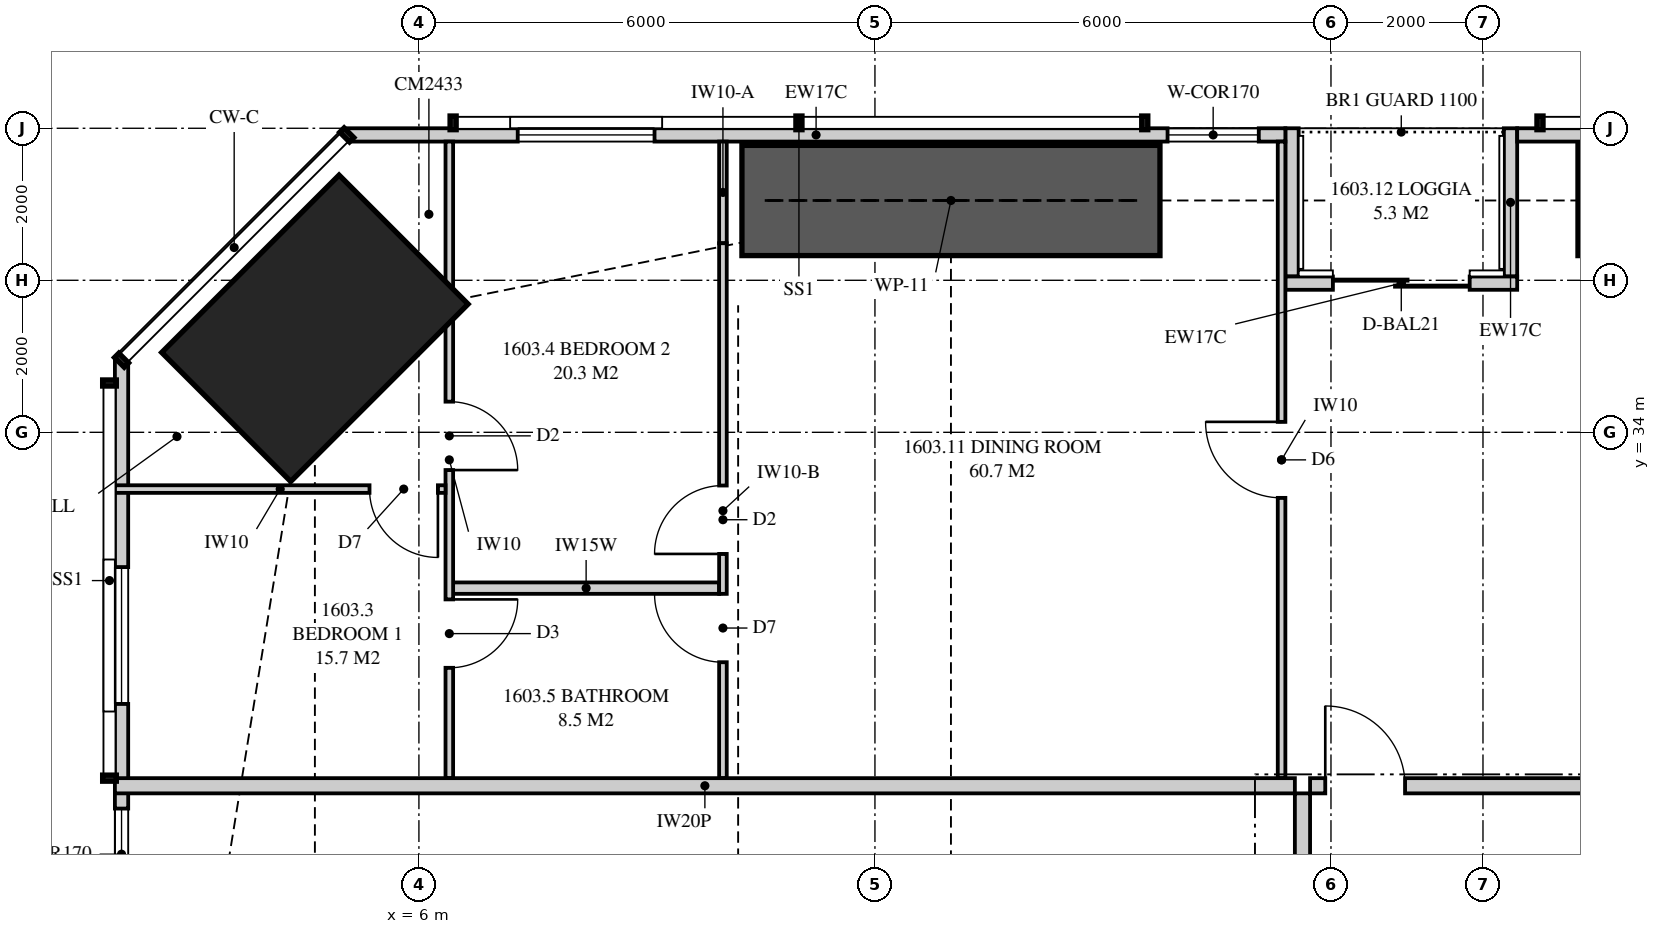
"""IFC4 building model, lengths in metres.
Left out: names, types, materials, properties, quantities, classifications, styles, units other than length and angle.
Written with IfcOpenShell. Run it as: python <this file> out.ifc"""

import sys

from ifc_helpers import new_model, si_unit, direction, frame, frame_2d, origin, origin_2d, place, context, subcontext, project, spatial, polyline, rectangle, outline, extrude, element, fill, save


model = new_model("IFC4")
c1 = context("Model", 3, precision=1e-05, world=origin(), true_north=direction((0.0, 1.0)))
c2 = subcontext(c1, "Body", "Model", "MODEL_VIEW")
j1 = project(units=[si_unit("LENGTHUNIT", "METRE"), si_unit("PLANEANGLEUNIT", "RADIAN")], contexts=[c1])
p1 = place(None, origin())
s1 = spatial("IfcSite", under=j1, at=p1, CompositionType="ELEMENT")
p2 = place(p1, origin())
s2 = spatial("IfcBuilding", under=s1, at=p2, CompositionType="ELEMENT")
p3 = place(p2, frame((0.0, 0.0, 61.2)))
s3 = spatial("IfcBuildingStorey", under=s2, at=p3, CompositionType="ELEMENT", Elevation=61.2)
p4 = place(p3, frame((4.631, 35.369, 0.0), z_axis=(0.0, 0.0, 1.0), x_axis=(0.707106781187, -0.707106781187, 0.0)))
e1 = element("IfcColumn", 1, at=p4, inside=s3, PredefinedType="COLUMN", context=c2, shape_type="SweptSolid", body=[
    extrude(rectangle(XDim=2.4, YDim=3.3, at=origin_2d()), origin(), (0.0, 0.0, 1.0), 3.35),
])
p5 = place(p3, frame((37.824, 37.913, 0.0), z_axis=(0.0, 0.0, 1.0), x_axis=(-1.0, 0.0, 0.0)))
e2 = element("IfcWall", 2, at=p5, inside=s3, PredefinedType="SOLIDWALL", context=c2, shape_type="SweptSolid", body=[
    extrude(outline(polyline([(0.0, 0.0), (17.374, 0.0), (17.374, 2.15), (2.824, 2.15), (2.824, 3.11), (2.668, 3.11), (2.668, 2.15), (2.62, 2.15), (2.62, 3.11), (0.0, 3.11), (0.0, 0.0)])), frame((0.0, 0.087, 0.0), z_axis=(0.0, -1.0, 0.0), x_axis=(1.0, 0.0, 0.0)), (0.0, 0.0, 1.0), 0.175),
])
p6 = place(p5, frame((5.699, 0.0, 0.4)))
e3 = element("IfcOpeningElement", 3, at=p6, cuts=e2, PredefinedType="OPENING", context=c2, shape_type="SweptSolid", body=[
    extrude(rectangle(XDim=1.8, YDim=1.7, at=frame_2d((0.9, 0.85))), frame((0.0, 0.097, 0.0), z_axis=(0.0, -1.0, 0.0), x_axis=(1.0, 0.0, 0.0)), (0.0, 0.0, 1.0), 0.195),
])
p7 = place(p5, frame((9.124, 0.0, 0.4)))
e4 = element("IfcOpeningElement", 4, at=p7, cuts=e2, PredefinedType="OPENING", context=c2, shape_type="SweptSolid", body=[
    extrude(rectangle(XDim=1.8, YDim=1.7, at=frame_2d((0.9, 0.85))), frame((0.0, 0.097, 0.0), z_axis=(0.0, -1.0, 0.0), x_axis=(1.0, 0.0, 0.0)), (0.0, 0.0, 1.0), 0.195),
])
p8 = place(p3, frame((17.4, 37.913, 0.0), z_axis=(0.0, 0.0, 1.0), x_axis=(-1.0, 0.0, 0.0)))
e5 = element("IfcWall", 5, at=p8, inside=s3, PredefinedType="SOLIDWALL", context=c2, shape_type="SweptSolid", body=[
    extrude(outline(polyline([(0.0, 0.0), (12.349, 0.0), (12.349, 3.11), (4.604, 3.11), (4.604, 2.15), (4.556, 2.15), (4.556, 3.11), (4.4, 3.11), (4.4, 2.15), (0.0, 2.15), (0.0, 0.0)])), frame((0.0, 0.087, 0.0), z_axis=(0.0, -1.0, 0.0), x_axis=(1.0, 0.0, 0.0)), (0.0, 0.0, 1.0), 0.175),
])
p9 = place(p8, frame((0.35, 0.0, 0.4)))
e6 = element("IfcOpeningElement", 6, at=p9, cuts=e5, PredefinedType="OPENING", context=c2, shape_type="SweptSolid", body=[
    extrude(rectangle(XDim=1.2, YDim=1.7, at=frame_2d((0.6, 0.85))), frame((0.0, 0.097, 0.0), z_axis=(0.0, -1.0, 0.0), x_axis=(1.0, 0.0, 0.0)), (0.0, 0.0, 1.0), 0.195),
])
p10 = place(p8, frame((8.3, 0.0, 0.4)))
e7 = element("IfcOpeningElement", 7, at=p10, cuts=e5, PredefinedType="OPENING", context=c2, shape_type="SweptSolid", body=[
    extrude(rectangle(XDim=1.8, YDim=1.7, at=frame_2d((0.9, 0.85))), frame((0.0, 0.097, 0.0), z_axis=(0.0, -1.0, 0.0), x_axis=(1.0, 0.0, 0.0)), (0.0, 0.0, 1.0), 0.195),
])
p11 = place(p3, frame((20.45, 35.962, 0.0), z_axis=(0.0, 0.0, 1.0), x_axis=(-1.0, 0.0, 0.0)))
e8 = element("IfcWall", 8, at=p11, inside=s3, PredefinedType="SOLIDWALL", context=c2, shape_type="SweptSolid", body=[
    extrude(rectangle(XDim=3.05, YDim=0.175, at=frame_2d((1.525, 0.0))), origin(), (0.0, 0.0, 1.0), 3.11),
])
p12 = place(p11, frame((0.625, 0.0, 0.0)))
e9 = element("IfcOpeningElement", 9, at=p12, cuts=e8, PredefinedType="OPENING", context=c2, shape_type="SweptSolid", body=[
    extrude(rectangle(XDim=1.8, YDim=2.1, at=frame_2d((0.9, 1.05))), frame((0.0, 0.097, 0.0), z_axis=(0.0, -1.0, 0.0), x_axis=(1.0, 0.0, 0.0)), (0.0, 0.0, 1.0), 0.195),
])
for number, where, z_axis, x_axis in (
    (10, (20.363, 38.0, 0.0), (0.0, 0.0, 1.0), (0.0, -1.0, 0.0)),
    (11, (17.488, 38.0, 0.0), (0.0, 0.0, 1.0), (0.0, -1.0, 0.0)),
):
    element("IfcWall", number, at=place(p3, frame(where, z_axis=z_axis, x_axis=x_axis)), inside=s3, PredefinedType="SOLIDWALL", context=c2, shape_type="SweptSolid", body=[
        extrude(outline(polyline([(0.0, 0.0), (1.95, 0.0), (1.95, 3.11), (1.75, 3.11), (1.75, 2.15), (0.15, 2.15), (0.15, 3.11), (0.0, 3.11), (0.0, 0.0)])), frame((0.0, 0.087, 0.0), z_axis=(0.0, -1.0, 0.0), x_axis=(1.0, 0.0, 0.0)), (0.0, 0.0, 1.0), 0.175),
    ])
p13 = place(p3, frame((2.087, 34.949, 0.0), z_axis=(0.0, 0.0, 1.0), x_axis=(0.0, -1.0, 0.0)))
e12 = element("IfcWall", 12, at=p13, inside=s3, PredefinedType="SOLIDWALL", context=c2, shape_type="SweptSolid", body=[
    extrude(outline(polyline([(0.0, 0.0), (15.599, 0.0), (15.599, 2.15), (9.949, 2.15), (9.949, 3.11), (9.823, 3.11), (9.823, 2.15), (9.73, 2.15), (9.73, 3.11), (0.0, 3.11), (0.0, 0.0)])), frame((0.0, 0.087, 0.0), z_axis=(0.0, -1.0, 0.0), x_axis=(1.0, 0.0, 0.0)), (0.0, 0.0, 1.0), 0.175),
])
p14 = place(p13, frame((2.722, 0.0, 0.4)))
e13 = element("IfcOpeningElement", 13, at=p14, cuts=e12, PredefinedType="OPENING", context=c2, shape_type="SweptSolid", body=[
    extrude(rectangle(XDim=1.8, YDim=1.7, at=frame_2d((0.9, 0.85))), frame((0.0, 0.097, 0.0), z_axis=(0.0, -1.0, 0.0), x_axis=(1.0, 0.0, 0.0)), (0.0, 0.0, 1.0), 0.195),
])
p15 = place(p13, frame((5.899, 0.0, 0.4)))
e14 = element("IfcOpeningElement", 14, at=p15, cuts=e12, PredefinedType="OPENING", context=c2, shape_type="SweptSolid", body=[
    extrude(rectangle(XDim=1.2, YDim=1.7, at=frame_2d((0.6, 0.85))), frame((0.0, 0.097, 0.0), z_axis=(0.0, -1.0, 0.0), x_axis=(1.0, 0.0, 0.0)), (0.0, 0.0, 1.0), 0.195),
])
p16 = place(p13, frame((12.824, 0.0, 0.4)))
e15 = element("IfcOpeningElement", 15, at=p16, cuts=e12, PredefinedType="OPENING", context=c2, shape_type="SweptSolid", body=[
    extrude(rectangle(XDim=1.8, YDim=1.7, at=frame_2d((0.9, 0.85))), frame((0.0, 0.097, 0.0), z_axis=(0.0, -1.0, 0.0), x_axis=(1.0, 0.0, 0.0)), (0.0, 0.0, 1.0), 0.195),
])
p17 = place(p3, frame((17.725, 29.35, 0.0), z_axis=(0.0, 0.0, 1.0), x_axis=(1.0, 0.0, 0.0)))
e16 = element("IfcWall", 16, at=p17, inside=s3, PredefinedType="PARTITIONING", context=c2, shape_type="SweptSolid", body=[
    extrude(outline(polyline([(0.0, 0.0), (15.275, 0.0), (15.275, 3.11), (6.612, 3.11), (6.612, 2.541), (5.938, 2.541), (5.938, 3.11), (0.0, 3.11), (0.0, 0.0)])), frame((0.0, 0.1, 0.0), z_axis=(0.0, -1.0, 0.0), x_axis=(1.0, 0.0, 0.0)), (0.0, 0.0, 1.0), 0.2),
])
p18 = place(p17, frame((0.2, 0.0, 0.0)))
e17 = element("IfcOpeningElement", 17, at=p18, cuts=e16, PredefinedType="OPENING", context=c2, shape_type="SweptSolid", body=[
    extrude(rectangle(XDim=1.05, YDim=2.2, at=frame_2d((0.525, 1.1))), frame((0.0, 0.11, 0.0), z_axis=(0.0, -1.0, 0.0), x_axis=(1.0, 0.0, 0.0)), (0.0, 0.0, 1.0), 0.22),
])
p19 = place(p3, frame((6.4, 37.825, 0.0), z_axis=(0.0, 0.0, 1.0), x_axis=(0.0, -1.0, 0.0)))
e18 = element("IfcWall", 18, at=p19, inside=s3, PredefinedType="PARTITIONING", context=c2, shape_type="SweptSolid", body=[
    extrude(outline(polyline([(0.0, 0.0), (8.375, 0.0), (8.375, 3.11), (2.978, 3.11), (2.978, 2.15), (1.224, 2.15), (1.224, 3.11), (0.0, 3.11), (0.0, 0.0)])), frame((0.0, 0.05, 0.0), z_axis=(0.0, -1.0, 0.0), x_axis=(1.0, 0.0, 0.0)), (0.0, 0.0, 1.0), 0.1),
])
p20 = place(p19, frame((3.422, 0.0, 0.0)))
e19 = element("IfcOpeningElement", 19, at=p20, cuts=e18, PredefinedType="OPENING", context=c2, shape_type="SweptSolid", body=[
    extrude(rectangle(XDim=0.9, YDim=2.1, at=frame_2d((0.45, 1.05))), frame((0.0, 0.06, 0.0), z_axis=(0.0, -1.0, 0.0), x_axis=(1.0, 0.0, 0.0)), (0.0, 0.0, 1.0), 0.12),
])
p21 = place(p19, frame((6.023, 0.0, 0.0)))
e20 = element("IfcOpeningElement", 20, at=p21, cuts=e18, PredefinedType="OPENING", context=c2, shape_type="SweptSolid", body=[
    extrude(rectangle(XDim=0.9, YDim=2.1, at=frame_2d((0.45, 1.05))), frame((0.0, 0.06, 0.0), z_axis=(0.0, -1.0, 0.0), x_axis=(1.0, 0.0, 0.0)), (0.0, 0.0, 1.0), 0.12),
])
p22 = place(p3, frame((10.0, 37.825, 0.0), z_axis=(0.0, 0.0, 1.0), x_axis=(0.0, -1.0, 0.0)))
e21 = element("IfcWall", 21, at=p22, inside=s3, PredefinedType="PARTITIONING", context=c2, shape_type="SweptSolid", body=[
    extrude(outline(polyline([(0.0, 0.0), (1.338, 0.0), (1.338, 2.15), (0.5, 2.15), (0.5, 3.11), (0.0, 3.11), (0.0, 0.0)])), frame((0.0, 0.05, 0.0), z_axis=(0.0, -1.0, 0.0), x_axis=(1.0, 0.0, 0.0)), (0.0, 0.0, 1.0), 0.1),
])
p23 = place(p3, frame((10.0, 36.487, 0.0), z_axis=(0.0, 0.0, 1.0), x_axis=(0.0, -1.0, 0.0)))
e22 = element("IfcWall", 22, at=p23, inside=s3, PredefinedType="PARTITIONING", context=c2, shape_type="SweptSolid", body=[
    extrude(outline(polyline([(0.0, 0.0), (7.037, 0.0), (7.037, 2.51), (0.917, 2.51), (0.917, 2.15), (0.0, 2.15), (0.0, 0.0)])), frame((0.0, 0.05, 0.0), z_axis=(0.0, -1.0, 0.0), x_axis=(1.0, 0.0, 0.0)), (0.0, 0.0, 1.0), 0.1),
])
p24 = place(p23, frame((3.188, 0.0, 0.0)))
e23 = element("IfcOpeningElement", 23, at=p24, cuts=e22, PredefinedType="OPENING", context=c2, shape_type="SweptSolid", body=[
    extrude(rectangle(XDim=0.9, YDim=2.1, at=frame_2d((0.45, 1.05))), frame((0.0, 0.06, 0.0), z_axis=(0.0, -1.0, 0.0), x_axis=(1.0, 0.0, 0.0)), (0.0, 0.0, 1.0), 0.12),
])
p25 = place(p23, frame((4.612, 0.0, 0.0)))
e24 = element("IfcOpeningElement", 24, at=p25, cuts=e22, PredefinedType="OPENING", context=c2, shape_type="SweptSolid", body=[
    extrude(rectangle(XDim=0.9, YDim=2.1, at=frame_2d((0.45, 1.05))), frame((0.0, 0.06, 0.0), z_axis=(0.0, -1.0, 0.0), x_axis=(1.0, 0.0, 0.0)), (0.0, 0.0, 1.0), 0.12),
])
p26 = place(p3, frame((2.0, 33.253, 0.0), z_axis=(0.0, 0.0, 1.0), x_axis=(1.0, 0.0, 0.0)))
e25 = element("IfcWall", 25, at=p26, inside=s3, PredefinedType="PARTITIONING", context=c2, shape_type="SweptSolid", body=[
    extrude(outline(polyline([(0.0, 0.0), (4.35, 0.0), (4.35, 3.11), (3.16, 3.11), (3.16, 2.15), (1.417, 2.15), (1.417, 3.11), (0.0, 3.11), (0.0, 0.0)])), frame((0.0, 0.05, 0.0), z_axis=(0.0, -1.0, 0.0), x_axis=(1.0, 0.0, 0.0)), (0.0, 0.0, 1.0), 0.1),
])
p27 = place(p26, frame((3.35, 0.0, 0.0)))
e26 = element("IfcOpeningElement", 26, at=p27, cuts=e25, PredefinedType="OPENING", context=c2, shape_type="SweptSolid", body=[
    extrude(rectangle(XDim=0.9, YDim=2.1, at=frame_2d((0.45, 1.05))), frame((0.0, 0.06, 0.0), z_axis=(0.0, -1.0, 0.0), x_axis=(1.0, 0.0, 0.0)), (0.0, 0.0, 1.0), 0.12),
])
p28 = place(p3, frame((6.45, 31.95, 0.0), z_axis=(0.0, 0.0, 1.0), x_axis=(1.0, 0.0, 0.0)))
e27 = element("IfcWall", 27, at=p28, inside=s3, PredefinedType="PLUMBINGWALL", context=c2, shape_type="SweptSolid", body=[
    extrude(outline(polyline([(0.0, 0.0), (3.5, 0.0), (3.5, 3.11), (3.5, 2.51), (2.465, 2.51), (2.465, 3.11), (0.0, 3.11), (0.0, 0.0)])), frame((0.0, 0.075, 0.0), z_axis=(0.0, -1.0, 0.0), x_axis=(1.0, 0.0, 0.0)), (0.0, 0.0, 1.0), 0.15),
])
p29 = place(p3, frame((17.35, 37.825, 0.0), z_axis=(0.0, 0.0, 1.0), x_axis=(0.0, -1.0, 0.0)))
e28 = element("IfcWall", 28, at=p29, inside=s3, PredefinedType="PARTITIONING", context=c2, shape_type="SweptSolid", body=[
    extrude(outline(polyline([(0.0, 0.0), (8.375, 0.0), (8.375, 3.11), (1.635, 3.11), (1.635, 2.15), (0.0, 2.15), (0.0, 3.11), (0.0, 0.0)])), frame((0.0, 0.05, 0.0), z_axis=(0.0, -1.0, 0.0), x_axis=(1.0, 0.0, 0.0)), (0.0, 0.0, 1.0), 0.1),
])
p30 = place(p29, frame((3.688, 0.0, 0.0)))
e29 = element("IfcOpeningElement", 29, at=p30, cuts=e28, PredefinedType="OPENING", context=c2, shape_type="SweptSolid", body=[
    extrude(rectangle(XDim=1.0, YDim=2.1, at=frame_2d((0.5, 1.05))), frame((0.0, 0.06, 0.0), z_axis=(0.0, -1.0, 0.0), x_axis=(1.0, 0.0, 0.0)), (0.0, 0.0, 1.0), 0.12),
])
p31 = place(p3, frame((2.0, 29.35, 0.0), z_axis=(0.0, 0.0, 1.0), x_axis=(1.0, 0.0, 0.0)))
e30 = element("IfcWall", 30, at=p31, inside=s3, PredefinedType="PARTITIONING", context=c2, shape_type="SweptSolid", body=[
    extrude(outline(polyline([(0.0, 0.0), (15.525, 0.0), (15.525, 3.11), (11.337, 3.11), (11.337, 2.541), (10.663, 2.541), (10.663, 3.11), (9.51, 3.11), (9.51, 2.51), (6.89, 2.51), (6.89, 3.11), (2.969, 3.11), (2.969, 2.541), (2.577, 2.541), (2.577, 2.15), (0.733, 2.15), (0.733, 3.11), (0.0, 3.11), (0.0, 0.0)])), frame((0.0, 0.1, 0.0), z_axis=(0.0, -1.0, 0.0), x_axis=(1.0, 0.0, 0.0)), (0.0, 0.0, 1.0), 0.2),
])
p32 = place(p3, frame((17.625, 24.2, 0.0), z_axis=(0.0, 0.0, 1.0), x_axis=(0.0, 1.0, 0.0)))
e31 = element("IfcWall", 31, at=p32, inside=s3, PredefinedType="PARTITIONING", context=c2, shape_type="SweptSolid", body=[
    extrude(outline(polyline([(0.0, 0.0), (5.05, 0.0), (5.05, 3.11), (1.137, 3.11), (1.137, 2.541), (0.463, 2.541), (0.463, 3.11), (0.0, 3.11), (0.0, 0.0)])), frame((0.0, 0.1, 0.0), z_axis=(0.0, -1.0, 0.0), x_axis=(1.0, 0.0, 0.0)), (0.0, 0.0, 1.0), 0.2),
])
p33 = place(p32, frame((1.075, 0.0, 0.0)))
e32 = element("IfcOpeningElement", 32, at=p33, cuts=e31, PredefinedType="OPENING", context=c2, shape_type="SweptSolid", body=[
    extrude(rectangle(XDim=1.8, YDim=2.1, at=frame_2d((0.9, 1.05))), frame((0.0, 0.11, 0.0), z_axis=(0.0, -1.0, 0.0), x_axis=(1.0, 0.0, 0.0)), (0.0, 0.0, 1.0), 0.22),
])
for number, where, z_axis, x_axis in (
    (33, (21.25, 37.05, 0.0), (0.0, 0.0, 1.0), (1.0, 0.0, 0.0)),
    (34, (10.25, 37.05, 0.0), (0.0, 0.0, 1.0), (1.0, 0.0, 0.0)),
):
    element("IfcWall", number, at=place(p3, frame(where, z_axis=z_axis, x_axis=x_axis)), inside=s3, PredefinedType="SHEAR", context=c2, shape_type="SweptSolid", body=[
        extrude(rectangle(XDim=5.5, YDim=1.45, at=frame_2d((2.75, 0.0))), origin(), (0.0, 0.0, 1.0), 3.35),
    ])
p34 = place(p12, origin())
e35 = element("IfcDoor", 35, at=p34, inside=s3, OperationType="SLIDING_TO_LEFT", PredefinedType="DOOR", context=c2, shape_type="SweptSolid", body=[
    extrude(rectangle(XDim=1.8, YDim=2.1, at=frame_2d((0.9, 1.05))), frame((0.0, 0.025, 0.0), z_axis=(0.0, -1.0, 0.0), x_axis=(1.0, 0.0, 0.0)), (0.0, 0.0, 1.0), 0.05),
])
fill(e9, e35)
p35 = place(p9, origin())
e36 = element("IfcWindow", 36, at=p35, inside=s3, PartitioningType="SINGLE_PANEL", PredefinedType="WINDOW", context=c2, shape_type="SweptSolid", body=[
    extrude(rectangle(XDim=1.2, YDim=1.7, at=frame_2d((0.6, 0.85))), frame((0.0, 0.03, 0.0), z_axis=(0.0, -1.0, 0.0), x_axis=(1.0, 0.0, 0.0)), (0.0, 0.0, 1.0), 0.06),
])
fill(e6, e36)
p36 = place(p10, origin())
e37 = element("IfcWindow", 37, at=p36, inside=s3, PartitioningType="SINGLE_PANEL", PredefinedType="WINDOW", context=c2, shape_type="SweptSolid", body=[
    extrude(rectangle(XDim=1.8, YDim=1.7, at=frame_2d((0.9, 0.85))), frame((0.0, 0.03, 0.0), z_axis=(0.0, -1.0, 0.0), x_axis=(1.0, 0.0, 0.0)), (0.0, 0.0, 1.0), 0.06),
])
fill(e7, e37)
p37 = place(p14, origin())
e38 = element("IfcWindow", 38, at=p37, inside=s3, PartitioningType="SINGLE_PANEL", PredefinedType="WINDOW", context=c2, shape_type="SweptSolid", body=[
    extrude(rectangle(XDim=1.8, YDim=1.7, at=frame_2d((0.9, 0.85))), frame((0.0, 0.03, 0.0), z_axis=(0.0, -1.0, 0.0), x_axis=(1.0, 0.0, 0.0)), (0.0, 0.0, 1.0), 0.06),
])
fill(e13, e38)
p38 = place(p15, origin())
e39 = element("IfcWindow", 39, at=p38, inside=s3, PartitioningType="SINGLE_PANEL", PredefinedType="WINDOW", context=c2, shape_type="SweptSolid", body=[
    extrude(rectangle(XDim=1.2, YDim=1.7, at=frame_2d((0.6, 0.85))), frame((0.0, 0.03, 0.0), z_axis=(0.0, -1.0, 0.0), x_axis=(1.0, 0.0, 0.0)), (0.0, 0.0, 1.0), 0.06),
])
fill(e14, e39)
p39 = place(p18, origin())
e40 = element("IfcDoor", 40, at=p39, inside=s3, OperationType="SINGLE_SWING_LEFT", PredefinedType="DOOR", context=c2, shape_type="SweptSolid", body=[
    extrude(rectangle(XDim=1.05, YDim=2.2, at=frame_2d((0.525, 1.1))), frame((0.0, 0.025, 0.0), z_axis=(0.0, -1.0, 0.0), x_axis=(1.0, 0.0, 0.0)), (0.0, 0.0, 1.0), 0.05),
])
fill(e17, e40)
p40 = place(p27, frame((0.9, 0.0, 0.0), z_axis=(0.0, 0.0, 1.0), x_axis=(-1.0, 0.0, 0.0)))
e41 = element("IfcDoor", 41, at=p40, inside=s3, OperationType="SINGLE_SWING_LEFT", PredefinedType="DOOR", context=c2, shape_type="SweptSolid", body=[
    extrude(rectangle(XDim=0.9, YDim=2.1, at=frame_2d((0.45, 1.05))), frame((0.0, 0.025, 0.0), z_axis=(0.0, -1.0, 0.0), x_axis=(1.0, 0.0, 0.0)), (0.0, 0.0, 1.0), 0.05),
])
fill(e26, e41)
p41 = place(p20, origin())
e42 = element("IfcDoor", 42, at=p41, inside=s3, OperationType="SINGLE_SWING_RIGHT", PredefinedType="DOOR", context=c2, shape_type="SweptSolid", body=[
    extrude(rectangle(XDim=0.9, YDim=2.1, at=frame_2d((0.45, 1.05))), frame((0.0, 0.025, 0.0), z_axis=(0.0, -1.0, 0.0), x_axis=(1.0, 0.0, 0.0)), (0.0, 0.0, 1.0), 0.05),
])
fill(e19, e42)
p42 = place(p24, frame((0.9, 0.0, 0.0), z_axis=(0.0, 0.0, 1.0), x_axis=(-1.0, 0.0, 0.0)))
e43 = element("IfcDoor", 43, at=p42, inside=s3, OperationType="SINGLE_SWING_LEFT", PredefinedType="DOOR", context=c2, shape_type="SweptSolid", body=[
    extrude(rectangle(XDim=0.9, YDim=2.1, at=frame_2d((0.45, 1.05))), frame((0.0, 0.025, 0.0), z_axis=(0.0, -1.0, 0.0), x_axis=(1.0, 0.0, 0.0)), (0.0, 0.0, 1.0), 0.05),
])
fill(e23, e43)
p43 = place(p25, frame((0.9, 0.0, 0.0), z_axis=(0.0, 0.0, 1.0), x_axis=(-1.0, 0.0, 0.0)))
e44 = element("IfcDoor", 44, at=p43, inside=s3, OperationType="SINGLE_SWING_RIGHT", PredefinedType="DOOR", context=c2, shape_type="SweptSolid", body=[
    extrude(rectangle(XDim=0.9, YDim=2.1, at=frame_2d((0.45, 1.05))), frame((0.0, 0.025, 0.0), z_axis=(0.0, -1.0, 0.0), x_axis=(1.0, 0.0, 0.0)), (0.0, 0.0, 1.0), 0.05),
])
fill(e24, e44)
p44 = place(p21, origin())
e45 = element("IfcDoor", 45, at=p44, inside=s3, OperationType="SINGLE_SWING_LEFT", PredefinedType="DOOR", context=c2, shape_type="SweptSolid", body=[
    extrude(rectangle(XDim=0.9, YDim=2.1, at=frame_2d((0.45, 1.05))), frame((0.0, 0.025, 0.0), z_axis=(0.0, -1.0, 0.0), x_axis=(1.0, 0.0, 0.0)), (0.0, 0.0, 1.0), 0.05),
])
fill(e20, e45)
p45 = place(p30, frame((1.0, 0.0, 0.0), z_axis=(0.0, 0.0, 1.0), x_axis=(-1.0, 0.0, 0.0)))
e46 = element("IfcDoor", 46, at=p45, inside=s3, OperationType="SINGLE_SWING_RIGHT", PredefinedType="DOOR", context=c2, shape_type="SweptSolid", body=[
    extrude(rectangle(XDim=1.0, YDim=2.1, at=frame_2d((0.5, 1.05))), frame((0.0, 0.025, 0.0), z_axis=(0.0, -1.0, 0.0), x_axis=(1.0, 0.0, 0.0)), (0.0, 0.0, 1.0), 0.05),
])
fill(e29, e46)
save(model, sys.argv[1])
